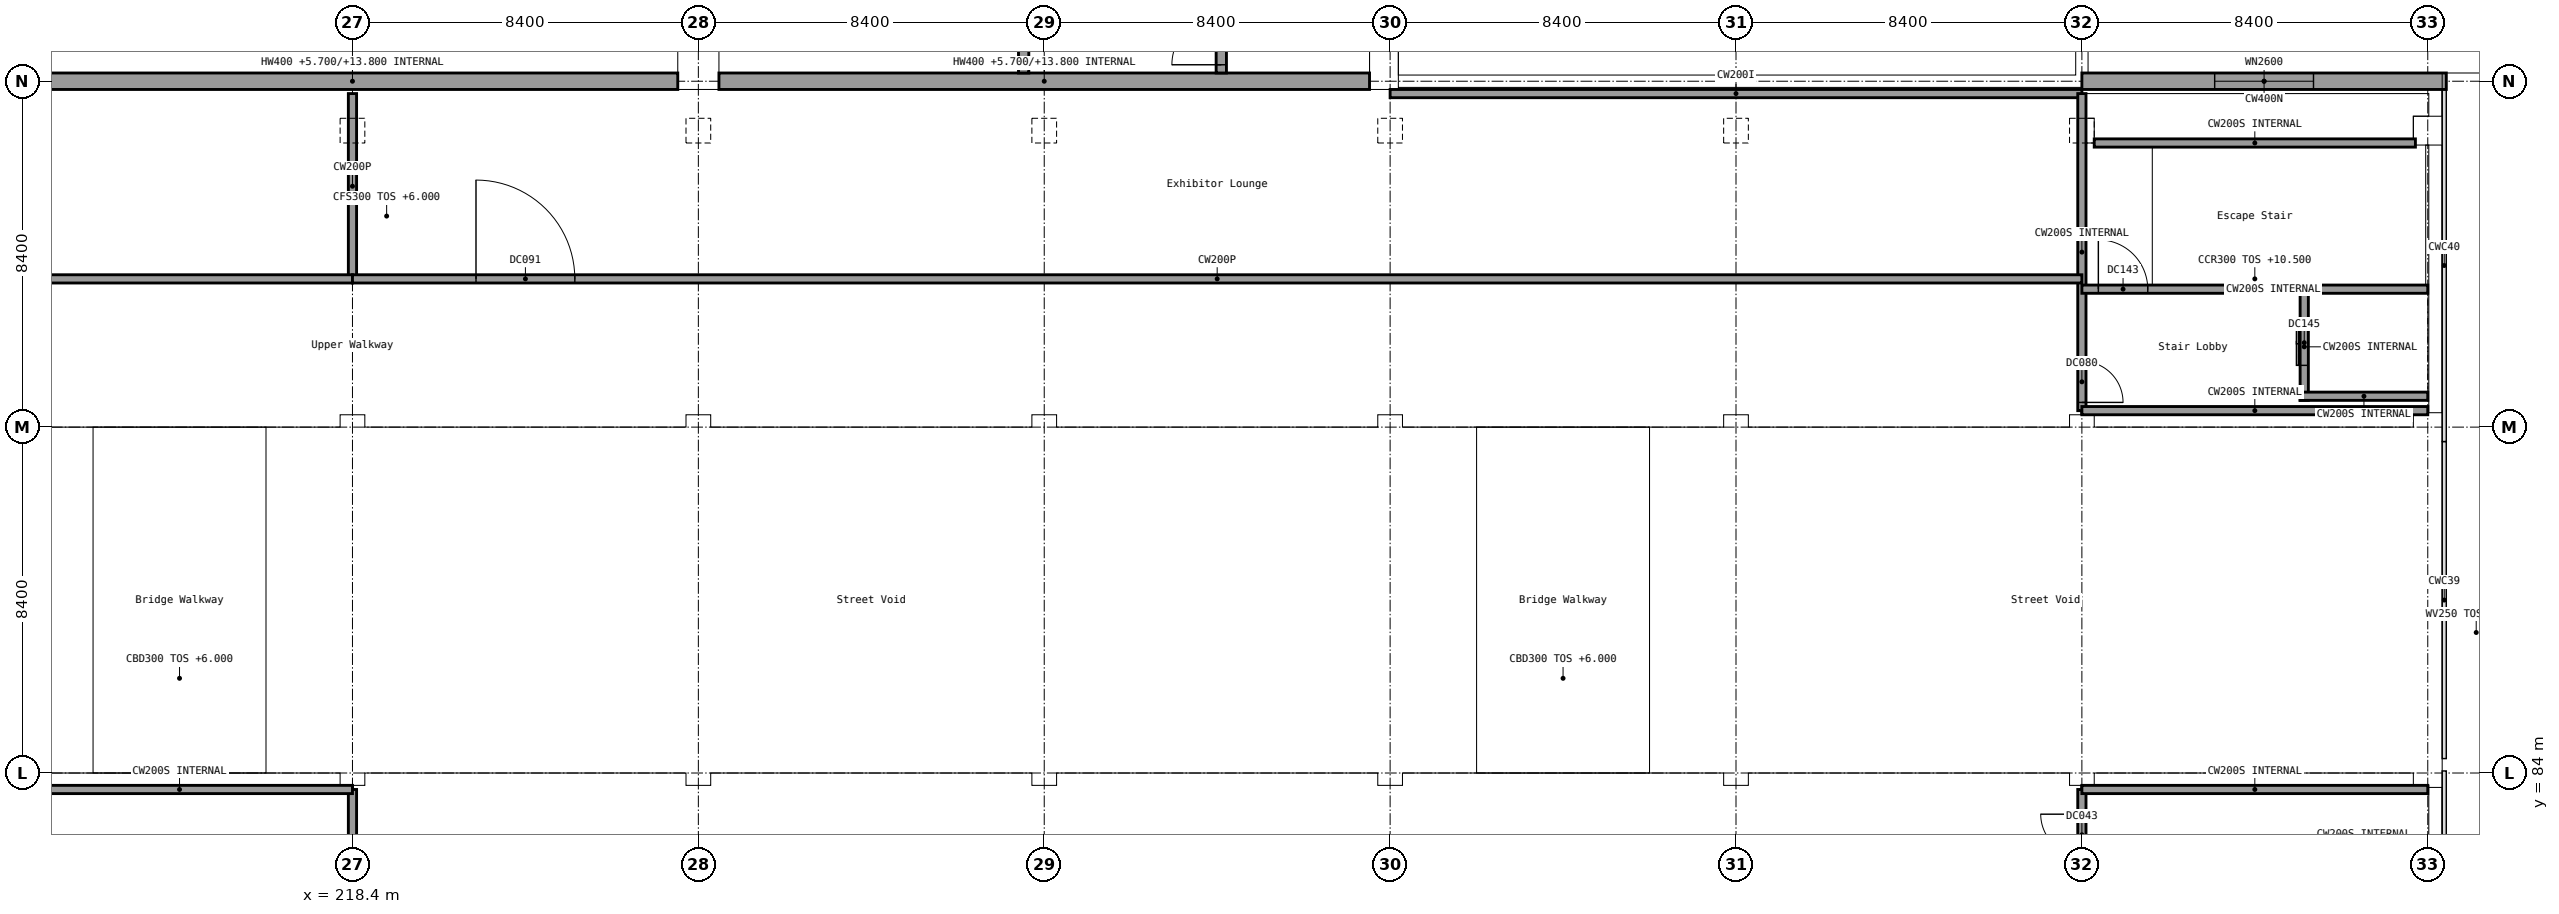
"""IFC4 building model, lengths in metres.
Left out: names, types, materials, properties, quantities, classifications, styles, units other than length and angle.
Written with IfcOpenShell. Run it as: python <this file> out.ifc"""

import sys

from ifc_helpers import new_model, si_unit, direction, frame, frame_2d, origin, origin_2d, place, context, subcontext, project, spatial, rectangle, extrude, element, fill, save


model = new_model("IFC4")
c1 = context("Model", 3, precision=1e-05, world=origin(), true_north=direction((0.0, 1.0)))
c2 = subcontext(c1, "Body", "Model", "MODEL_VIEW")
j1 = project(units=[si_unit("LENGTHUNIT", "METRE"), si_unit("PLANEANGLEUNIT", "RADIAN")], contexts=[c1])
p1 = place(None, origin())
s1 = spatial("IfcSite", under=j1, at=p1, CompositionType="ELEMENT")
p2 = place(p1, origin())
s2 = spatial("IfcBuilding", under=s1, at=p2, CompositionType="ELEMENT")
p3 = place(p2, frame((0.0, 0.0, 6.0)))
s3 = spatial("IfcBuildingStorey", under=s2, at=p3, CompositionType="ELEMENT", Elevation=6.0)
for number, where, z_axis, x_axis in (
    (1, (226.8, 100.8, 0.0), (0.0, 0.0, 1.0), (1.0, 0.0, 0.0)),
    (2, (243.6, 100.8, 0.0), (0.0, 0.0, 1.0), (1.0, 0.0, 0.0)),
):
    element("IfcColumn", number, at=place(p3, frame(where, z_axis=z_axis, x_axis=x_axis)), inside=s3, PredefinedType="COLUMN", context=c2, shape_type="SweptSolid", body=[
        extrude(rectangle(XDim=1.0, YDim=1.6, at=origin_2d()), origin(), (0.0, 0.0, 1.0), 4.5),
    ])
for number, where, z_axis, x_axis in (
    (3, (210.5, 100.8, -0.3), (0.0, 0.0, 1.0), (1.0, 0.0, 0.0)),
    (4, (227.3, 100.8, -0.3), (0.0, 0.0, 1.0), (1.0, 0.0, 0.0)),
):
    element("IfcWall", number, at=place(p3, frame(where, z_axis=z_axis, x_axis=x_axis)), inside=s3, PredefinedType="STANDARD", context=c2, shape_type="SweptSolid", body=[
        extrude(rectangle(XDim=15.8, YDim=0.4, at=frame_2d((7.9, 0.0))), origin(), (0.0, 0.0, 1.0), 8.1),
    ])
p4 = place(p3, frame((239.5, 101.0, 0.0), z_axis=(0.0, 0.0, 1.0), x_axis=(0.0, 1.0, 0.0)))
e5 = element("IfcWall", 5, at=p4, inside=s3, PredefinedType="SHEAR", context=c2, shape_type="SweptSolid", body=[
    extrude(rectangle(XDim=8.2, YDim=0.25, at=frame_2d((4.1, 0.0))), origin(), (0.0, 0.0, 1.0), 4.1),
])
p5 = place(p4, frame((0.2, 0.0, 0.0)))
e6 = element("IfcOpeningElement", 6, at=p5, cuts=e5, PredefinedType="OPENING", context=c2, shape_type="SweptSolid", body=[
    extrude(rectangle(XDim=1.2, YDim=2.1, at=frame_2d((0.6, 1.05))), frame((0.0, 0.125, 0.0), z_axis=(0.0, -1.0, 0.0), x_axis=(1.0, 0.0, 0.0)), (0.0, 0.0, 1.0), 0.25),
])
p6 = place(p3, frame((234.7, 101.0, 0.0), z_axis=(0.0, 0.0, 1.0), x_axis=(0.0, 1.0, 0.0)))
e7 = element("IfcWall", 7, at=p6, inside=s3, PredefinedType="SHEAR", context=c2, shape_type="SweptSolid", body=[
    extrude(rectangle(XDim=8.2, YDim=0.25, at=frame_2d((4.1, 0.0))), origin(), (0.0, 0.0, 1.0), 4.1),
])
p7 = place(p6, frame((2.0, 0.0, 0.0)))
e8 = element("IfcOpeningElement", 8, at=p7, cuts=e7, PredefinedType="OPENING", context=c2, shape_type="SweptSolid", body=[
    extrude(rectangle(XDim=1.2, YDim=2.1, at=frame_2d((0.6, 1.05))), frame((0.0, 0.125, 0.0), z_axis=(0.0, -1.0, 0.0), x_axis=(1.0, 0.0, 0.0)), (0.0, 0.0, 1.0), 0.25),
])
for number, where, z_axis, x_axis in (
    (9, (218.4, 99.6, 0.0), (0.0, 0.0, 1.0), (1.0, 0.0, 0.0)),
    (10, (226.8, 99.6, 0.0), (0.0, 0.0, 1.0), (1.0, 0.0, 0.0)),
    (11, (235.2, 99.6, 0.0), (0.0, 0.0, 1.0), (1.0, 0.0, 0.0)),
    (12, (243.6, 99.6, 0.0), (0.0, 0.0, 1.0), (1.0, 0.0, 0.0)),
    (13, (252.0, 99.6, 0.0), (0.0, 0.0, 1.0), (1.0, 0.0, 0.0)),
    (14, (260.4, 99.6, 0.0), (0.0, 0.0, 1.0), (1.0, 0.0, 0.0)),
):
    element("IfcColumn", number, at=place(p3, frame(where, z_axis=z_axis, x_axis=x_axis)), inside=s3, PredefinedType="COLUMN", context=c2, shape_type="SweptSolid", body=[
        extrude(rectangle(XDim=0.6, YDim=0.6, at=origin_2d()), origin(), (0.0, 0.0, 1.0), 4.5),
    ])
p8 = place(p3, frame((268.8, 99.6, 0.0), z_axis=(0.0, 0.0, 1.0), x_axis=(1.0, 0.0, 0.0)))
e15 = element("IfcColumn", 15, at=p8, inside=s3, PredefinedType="COLUMN", context=c2, shape_type="SweptSolid", body=[
    extrude(rectangle(XDim=0.7, YDim=0.7, at=origin_2d()), origin(), (0.0, 0.0, 1.0), 4.5),
])
p9 = place(p3, frame((260.4, 100.8, 0.0), z_axis=(0.0, 0.0, 1.0), x_axis=(1.0, 0.0, 0.0)))
e16 = element("IfcWall", 16, at=p9, inside=s3, PredefinedType="SOLIDWALL", context=c2, shape_type="SweptSolid", body=[
    extrude(rectangle(XDim=8.85, YDim=0.4, at=frame_2d((4.425, 0.0))), origin(), (0.0, 0.0, 1.0), 4.5),
])
p10 = place(p9, frame((3.225, 0.0, 1.0)))
e17 = element("IfcOpeningElement", 17, at=p10, cuts=e16, PredefinedType="OPENING", context=c2, shape_type="SweptSolid", body=[
    extrude(rectangle(XDim=2.4, YDim=2.4, at=frame_2d((1.2, 1.2))), frame((0.0, 0.2, 0.0), z_axis=(0.0, -1.0, 0.0), x_axis=(1.0, 0.0, 0.0)), (0.0, 0.0, 1.0), 0.4),
])
p11 = place(p3, frame((243.6, 100.5, 0.0), z_axis=(0.0, 0.0, 1.0), x_axis=(1.0, 0.0, 0.0)))
e18 = element("IfcWall", 18, at=p11, inside=s3, PredefinedType="SOLIDWALL", context=c2, shape_type="SweptSolid", body=[
    extrude(rectangle(XDim=16.8, YDim=0.2, at=frame_2d((8.4, 0.0))), origin(), (0.0, 0.0, 1.0), 4.5),
])
p12 = place(p3, frame((218.4, 75.4, 0.0), z_axis=(0.0, 0.0, 1.0), x_axis=(0.0, 1.0, 0.0)))
e19 = element("IfcWall", 19, at=p12, inside=s3, PredefinedType="SOLIDWALL", context=c2, shape_type="SweptSolid", body=[
    extrude(rectangle(XDim=8.2, YDim=0.2, at=frame_2d((4.1, 0.0))), origin(), (0.0, 0.0, 1.0), 4.2),
])
p13 = place(p3, frame((260.4, 75.4, 0.0), z_axis=(0.0, 0.0, 1.0), x_axis=(0.0, 1.0, 0.0)))
e20 = element("IfcWall", 20, at=p13, inside=s3, PredefinedType="SOLIDWALL", context=c2, shape_type="SweptSolid", body=[
    extrude(rectangle(XDim=8.2, YDim=0.2, at=frame_2d((4.1, 0.0))), origin(), (0.0, 0.0, 1.0), 4.2),
])
p14 = place(p13, frame((6.6, 0.0, 0.0)))
e21 = element("IfcOpeningElement", 21, at=p14, cuts=e20, PredefinedType="OPENING", context=c2, shape_type="SweptSolid", body=[
    extrude(rectangle(XDim=1.0, YDim=2.4, at=frame_2d((0.5, 1.2))), frame((0.0, 0.1, 0.0), z_axis=(0.0, -1.0, 0.0), x_axis=(1.0, 0.0, 0.0)), (0.0, 0.0, 1.0), 0.2),
])
p15 = place(p3, frame((210.0, 83.6, 0.0), z_axis=(0.0, 0.0, 1.0), x_axis=(1.0, 0.0, 0.0)))
e22 = element("IfcWall", 22, at=p15, inside=s3, PredefinedType="SOLIDWALL", context=c2, shape_type="SweptSolid", body=[
    extrude(rectangle(XDim=8.4, YDim=0.2, at=frame_2d((4.2, 0.0))), origin(), (0.0, 0.0, 1.0), 4.2),
])
p16 = place(p3, frame((260.4, 83.6, 0.0), z_axis=(0.0, 0.0, 1.0), x_axis=(1.0, 0.0, 0.0)))
e23 = element("IfcWall", 23, at=p16, inside=s3, PredefinedType="SOLIDWALL", context=c2, shape_type="SweptSolid", body=[
    extrude(rectangle(XDim=8.4, YDim=0.2, at=frame_2d((4.2, 0.0))), origin(), (0.0, 0.0, 1.0), 4.2),
])
p17 = place(p3, frame((218.4, 100.5, 0.0), z_axis=(0.0, 0.0, 1.0), x_axis=(0.0, -1.0, 0.0)))
e24 = element("IfcWall", 24, at=p17, inside=s3, PredefinedType="PARTITIONING", context=c2, shape_type="SweptSolid", body=[
    extrude(rectangle(XDim=4.5, YDim=0.2, at=frame_2d((2.25, 0.0))), origin(), (0.0, 0.0, 1.0), 4.5),
])
p18 = place(p3, frame((260.4, 100.5, 0.0), z_axis=(0.0, 0.0, 1.0), x_axis=(0.0, -1.0, 0.0)))
e25 = element("IfcWall", 25, at=p18, inside=s3, PredefinedType="SOLIDWALL", context=c2, shape_type="SweptSolid", body=[
    extrude(rectangle(XDim=7.7, YDim=0.2, at=frame_2d((3.85, 0.0))), origin(), (0.0, 0.0, 1.0), 4.2),
])
p19 = place(p18, frame((6.5, 0.0, 0.0)))
e26 = element("IfcOpeningElement", 26, at=p19, cuts=e25, PredefinedType="OPENING", context=c2, shape_type="SweptSolid", body=[
    extrude(rectangle(XDim=1.0, YDim=2.4, at=frame_2d((0.5, 1.2))), frame((0.0, 0.1, 0.0), z_axis=(0.0, -1.0, 0.0), x_axis=(1.0, 0.0, 0.0)), (0.0, 0.0, 1.0), 0.2),
])
p20 = place(p3, frame((201.6, 96.0, 0.0), z_axis=(0.0, 0.0, 1.0), x_axis=(1.0, 0.0, 0.0)))
e27 = element("IfcWall", 27, at=p20, inside=s3, PredefinedType="PARTITIONING", context=c2, shape_type="SweptSolid", body=[
    extrude(rectangle(XDim=16.8, YDim=0.2, at=frame_2d((8.4, 0.0))), origin(), (0.0, 0.0, 1.0), 4.5),
])
p21 = place(p20, frame((3.3, 0.0, 0.0)))
e28 = element("IfcOpeningElement", 28, at=p21, cuts=e27, PredefinedType="OPENING", context=c2, shape_type="SweptSolid", body=[
    extrude(rectangle(XDim=1.8, YDim=2.4, at=frame_2d((0.9, 1.2))), frame((0.0, 0.1, 0.0), z_axis=(0.0, -1.0, 0.0), x_axis=(1.0, 0.0, 0.0)), (0.0, 0.0, 1.0), 0.2),
])
p22 = place(p3, frame((218.4, 96.0, 0.0), z_axis=(0.0, 0.0, 1.0), x_axis=(1.0, 0.0, 0.0)))
e29 = element("IfcWall", 29, at=p22, inside=s3, PredefinedType="PARTITIONING", context=c2, shape_type="SweptSolid", body=[
    extrude(rectangle(XDim=42.0, YDim=0.2, at=frame_2d((21.0, 0.0))), origin(), (0.0, 0.0, 1.0), 4.5),
])
p23 = place(p22, frame((3.0, 0.0, 0.0)))
e30 = element("IfcOpeningElement", 30, at=p23, cuts=e29, PredefinedType="OPENING", context=c2, shape_type="SweptSolid", body=[
    extrude(rectangle(XDim=2.4, YDim=2.4, at=frame_2d((1.2, 1.2))), frame((0.0, 0.1, 0.0), z_axis=(0.0, -1.0, 0.0), x_axis=(1.0, 0.0, 0.0)), (0.0, 0.0, 1.0), 0.2),
])
p24 = place(p3, frame((260.4, 92.8, 0.0), z_axis=(0.0, 0.0, 1.0), x_axis=(1.0, 0.0, 0.0)))
e31 = element("IfcWall", 31, at=p24, inside=s3, PredefinedType="SOLIDWALL", context=c2, shape_type="SweptSolid", body=[
    extrude(rectangle(XDim=8.4, YDim=0.2, at=frame_2d((4.2, 0.0))), origin(), (0.0, 0.0, 1.0), 4.2),
])
p25 = place(p3, frame((260.7, 99.3, 0.0), z_axis=(0.0, 0.0, 1.0), x_axis=(1.0, 0.0, 0.0)))
e32 = element("IfcWall", 32, at=p25, inside=s3, PredefinedType="SOLIDWALL", context=c2, shape_type="SweptSolid", body=[
    extrude(rectangle(XDim=7.8, YDim=0.2, at=frame_2d((3.9, 0.0))), origin(), (0.0, 0.0, 1.0), 4.2),
])
p26 = place(p3, frame((260.4, 95.75, 0.0), z_axis=(0.0, 0.0, 1.0), x_axis=(1.0, 0.0, 0.0)))
e33 = element("IfcWall", 33, at=p26, inside=s3, PredefinedType="SOLIDWALL", context=c2, shape_type="SweptSolid", body=[
    extrude(rectangle(XDim=8.4, YDim=0.2, at=frame_2d((4.2, 0.0))), origin(), (0.0, 0.0, 1.0), 4.2),
])
p27 = place(p26, frame((0.4, 0.0, 0.0)))
e34 = element("IfcOpeningElement", 34, at=p27, cuts=e33, PredefinedType="OPENING", context=c2, shape_type="SweptSolid", body=[
    extrude(rectangle(XDim=1.2, YDim=2.4, at=frame_2d((0.6, 1.2))), frame((0.0, 0.1, 0.0), z_axis=(0.0, -1.0, 0.0), x_axis=(1.0, 0.0, 0.0)), (0.0, 0.0, 1.0), 0.2),
])
p28 = place(p3, frame((265.8, 93.05, 0.0), z_axis=(0.0, 0.0, 1.0), x_axis=(0.0, 1.0, 0.0)))
e35 = element("IfcWall", 35, at=p28, inside=s3, PredefinedType="SOLIDWALL", context=c2, shape_type="SweptSolid", body=[
    extrude(rectangle(XDim=2.6, YDim=0.2, at=frame_2d((1.3, 0.0))), origin(), (0.0, 0.0, 1.0), 4.2),
])
p29 = place(p28, frame((0.85, 0.0, 0.0)))
e36 = element("IfcOpeningElement", 36, at=p29, cuts=e35, PredefinedType="OPENING", context=c2, shape_type="SweptSolid", body=[
    extrude(rectangle(XDim=1.1, YDim=2.1, at=frame_2d((0.55, 1.05))), frame((0.0, 0.1, 0.0), z_axis=(0.0, -1.0, 0.0), x_axis=(1.0, 0.0, 0.0)), (0.0, 0.0, 1.0), 0.2),
])
p30 = place(p3, frame((265.7, 93.15, 0.0), z_axis=(0.0, 0.0, 1.0), x_axis=(1.0, 0.0, 0.0)))
e37 = element("IfcWall", 37, at=p30, inside=s3, PredefinedType="SOLIDWALL", context=c2, shape_type="SweptSolid", body=[
    extrude(rectangle(XDim=3.1, YDim=0.2, at=frame_2d((1.55, 0.0))), origin(), (0.0, 0.0, 1.0), 4.2),
])
p31 = place(p5, origin())
e38 = element("IfcDoor", 38, at=p31, inside=s3, OperationType="SINGLE_SWING_LEFT", PredefinedType="DOOR", context=c2, shape_type="SweptSolid", body=[
    extrude(rectangle(XDim=1.2, YDim=2.1, at=frame_2d((0.6, 1.05))), frame((0.0, 0.025, 0.0), z_axis=(0.0, -1.0, 0.0), x_axis=(1.0, 0.0, 0.0)), (0.0, 0.0, 1.0), 0.05),
])
fill(e6, e38)
p32 = place(p10, origin())
e39 = element("IfcWindow", 39, at=p32, inside=s3, PartitioningType="SINGLE_PANEL", PredefinedType="WINDOW", context=c2, shape_type="SweptSolid", body=[
    extrude(rectangle(XDim=2.4, YDim=2.4, at=frame_2d((1.2, 1.2))), frame((0.0, 0.03, 0.0), z_axis=(0.0, -1.0, 0.0), x_axis=(1.0, 0.0, 0.0)), (0.0, 0.0, 1.0), 0.06),
])
fill(e17, e39)
p33 = place(p14, origin())
e40 = element("IfcDoor", 40, at=p33, inside=s3, OperationType="SINGLE_SWING_RIGHT", PredefinedType="DOOR", context=c2, shape_type="SweptSolid", body=[
    extrude(rectangle(XDim=1.0, YDim=2.4, at=frame_2d((0.5, 1.2))), frame((0.0, 0.025, 0.0), z_axis=(0.0, -1.0, 0.0), x_axis=(1.0, 0.0, 0.0)), (0.0, 0.0, 1.0), 0.05),
])
fill(e21, e40)
p34 = place(p19, origin())
e41 = element("IfcDoor", 41, at=p34, inside=s3, OperationType="SINGLE_SWING_RIGHT", PredefinedType="DOOR", context=c2, shape_type="SweptSolid", body=[
    extrude(rectangle(XDim=1.0, YDim=2.4, at=frame_2d((0.5, 1.2))), frame((0.0, 0.025, 0.0), z_axis=(0.0, -1.0, 0.0), x_axis=(1.0, 0.0, 0.0)), (0.0, 0.0, 1.0), 0.05),
])
fill(e26, e41)
p35 = place(p23, origin())
e42 = element("IfcDoor", 42, at=p35, inside=s3, OperationType="DOUBLE_DOOR_DOUBLE_SWING", PredefinedType="DOOR", context=c2, shape_type="SweptSolid", body=[
    extrude(rectangle(XDim=2.4, YDim=2.4, at=frame_2d((1.2, 1.2))), frame((0.0, 0.025, 0.0), z_axis=(0.0, -1.0, 0.0), x_axis=(1.0, 0.0, 0.0)), (0.0, 0.0, 1.0), 0.05),
])
fill(e30, e42)
p36 = place(p27, origin())
e43 = element("IfcDoor", 43, at=p36, inside=s3, OperationType="SINGLE_SWING_LEFT", PredefinedType="DOOR", context=c2, shape_type="SweptSolid", body=[
    extrude(rectangle(XDim=1.2, YDim=2.4, at=frame_2d((0.6, 1.2))), frame((0.0, 0.025, 0.0), z_axis=(0.0, -1.0, 0.0), x_axis=(1.0, 0.0, 0.0)), (0.0, 0.0, 1.0), 0.05),
])
fill(e34, e43)
p37 = place(p29, origin())
e44 = element("IfcDoor", 44, at=p37, inside=s3, OperationType="DOUBLE_DOOR_SLIDING", PredefinedType="DOOR", context=c2, shape_type="SweptSolid", body=[
    extrude(rectangle(XDim=1.1, YDim=2.1, at=frame_2d((0.55, 1.05))), frame((0.0, 0.025, 0.0), z_axis=(0.0, -1.0, 0.0), x_axis=(1.0, 0.0, 0.0)), (0.0, 0.0, 1.0), 0.05),
])
fill(e36, e44)
save(model, sys.argv[1])
